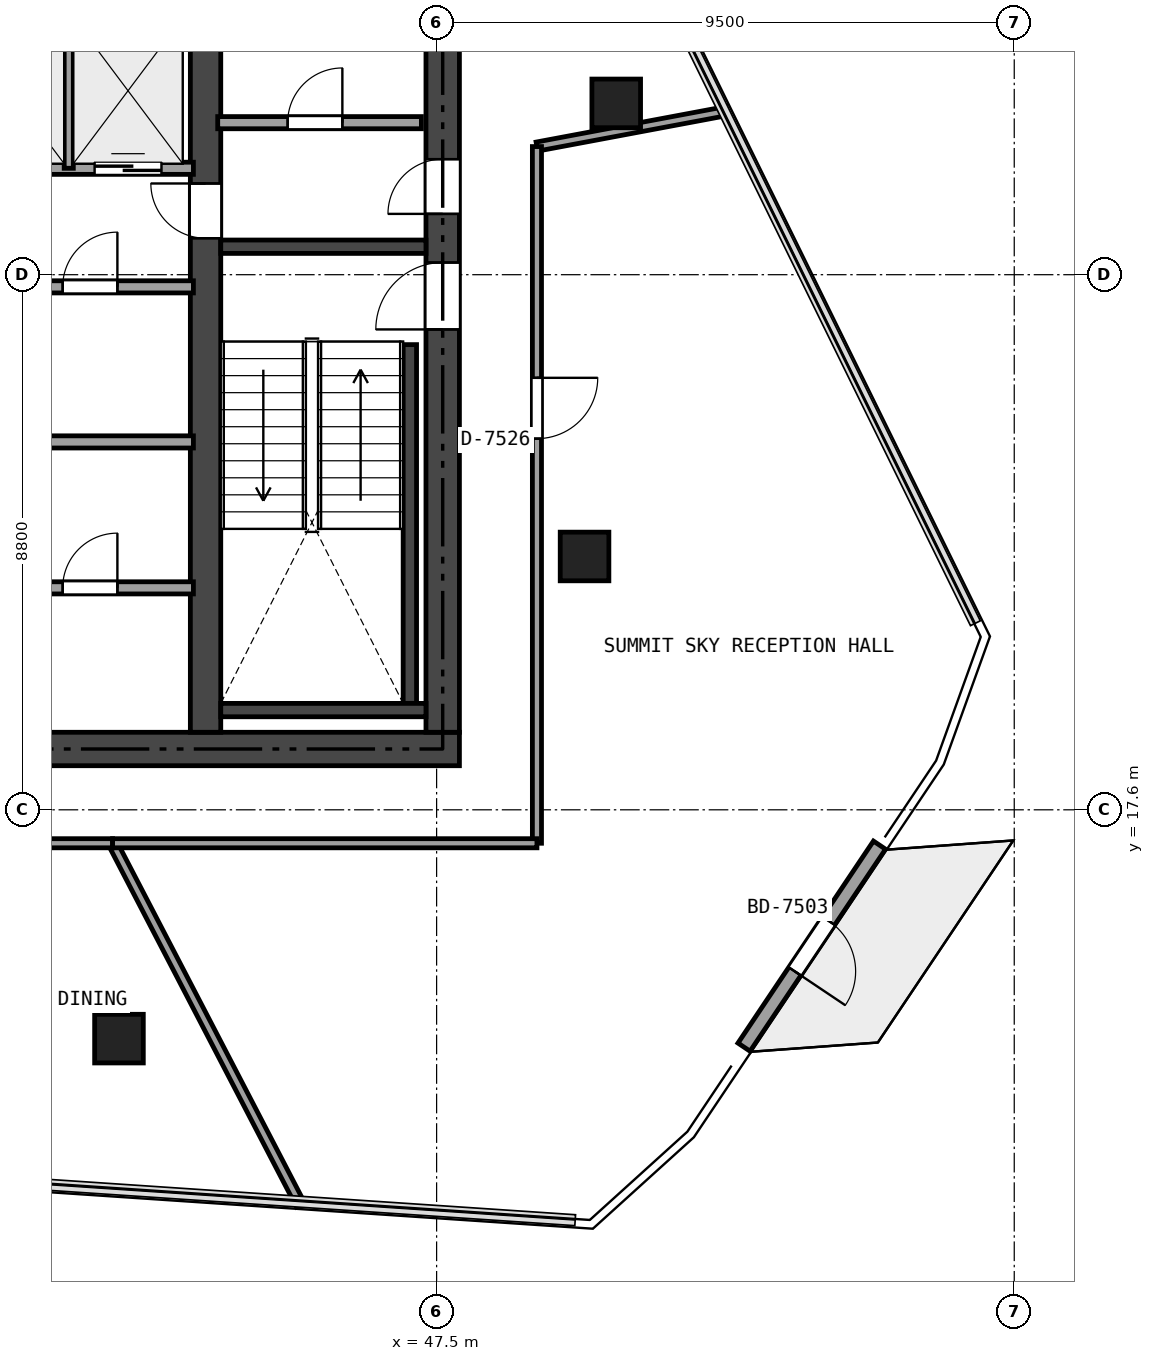
"""IFC4 building model, lengths in metres.
Left out: names, types, materials, properties, quantities, classifications, styles, units other than length and angle.
Written with IfcOpenShell. Run it as: python <this file> out.ifc"""

import sys

from ifc_helpers import new_model, si_unit, direction, frame, frame_2d, origin, origin_2d, place, context, subcontext, project, spatial, rectangle, extrude, element, fill, save


model = new_model("IFC4")
c1 = context("Model", 3, precision=1e-05, world=origin(), true_north=direction((0.0, 1.0)))
c2 = subcontext(c1, "Body", "Model", "MODEL_VIEW")
j1 = project(units=[si_unit("LENGTHUNIT", "METRE"), si_unit("PLANEANGLEUNIT", "RADIAN")], contexts=[c1])
p1 = place(None, origin())
s1 = spatial("IfcSite", under=j1, at=p1, CompositionType="ELEMENT")
p2 = place(p1, origin())
s2 = spatial("IfcBuilding", under=s1, at=p2, CompositionType="ELEMENT")
p3 = place(p2, frame((0.0, 0.0, 279.3)))
s3 = spatial("IfcBuildingStorey", under=s2, at=p3, CompositionType="ELEMENT", Elevation=279.3)
p4 = place(p3, frame((26.525, 18.6, 0.0), z_axis=(0.0, 0.0, 1.0), x_axis=(1.0, 0.0, 0.0)))
e1 = element("IfcWall", 1, at=p4, inside=s3, PredefinedType="SHEAR", context=c2, shape_type="SweptSolid", body=[
    extrude(rectangle(XDim=21.35, YDim=0.55, at=frame_2d((10.675, 0.0))), origin(), (0.0, 0.0, 1.0), 3.84),
])
p5 = place(p4, frame((12.4, 0.0, 0.0)))
e2 = element("IfcOpeningElement", 2, at=p5, cuts=e1, PredefinedType="OPENING", context=c2, shape_type="SweptSolid", body=[
    extrude(rectangle(XDim=1.15, YDim=2.15, at=frame_2d((0.575, 1.075))), frame((0.0, 0.285, 0.0), z_axis=(0.0, -1.0, 0.0), x_axis=(1.0, 0.0, 0.0)), (0.0, 0.0, 1.0), 0.57),
])
p6 = place(p4, frame((5.225, 0.0, 0.0)))
e3 = element("IfcOpeningElement", 3, at=p6, cuts=e1, PredefinedType="OPENING", context=c2, shape_type="SweptSolid", body=[
    extrude(rectangle(XDim=0.9, YDim=2.1, at=frame_2d((0.45, 1.05))), frame((0.0, 0.285, 0.0), z_axis=(0.0, -1.0, 0.0), x_axis=(1.0, 0.0, 0.0)), (0.0, 0.0, 1.0), 0.57),
])
p7 = place(p3, frame((47.6, 18.875, 0.0), z_axis=(0.0, 0.0, 1.0), x_axis=(0.0, 1.0, 0.0)))
e4 = element("IfcWall", 4, at=p7, inside=s3, PredefinedType="SHEAR", context=c2, shape_type="SweptSolid", body=[
    extrude(rectangle(XDim=15.05, YDim=0.55, at=frame_2d((7.525, 0.0))), origin(), (0.0, 0.0, 1.0), 3.84),
])
p8 = place(p7, frame((6.625, 0.0, 0.0)))
e5 = element("IfcOpeningElement", 5, at=p8, cuts=e4, PredefinedType="OPENING", context=c2, shape_type="SweptSolid", body=[
    extrude(rectangle(XDim=1.1, YDim=2.15, at=frame_2d((0.55, 1.075))), frame((0.0, 0.285, 0.0), z_axis=(0.0, -1.0, 0.0), x_axis=(1.0, 0.0, 0.0)), (0.0, 0.0, 1.0), 0.57),
])
p9 = place(p7, frame((8.525, 0.0, 0.0)))
e6 = element("IfcOpeningElement", 6, at=p9, cuts=e4, PredefinedType="OPENING", context=c2, shape_type="SweptSolid", body=[
    extrude(rectangle(XDim=0.9, YDim=2.1, at=frame_2d((0.45, 1.05))), frame((0.0, 0.285, 0.0), z_axis=(0.0, -1.0, 0.0), x_axis=(1.0, 0.0, 0.0)), (0.0, 0.0, 1.0), 0.57),
])
p10 = place(p7, frame((13.175, 0.0, 0.0)))
e7 = element("IfcOpeningElement", 7, at=p10, cuts=e4, PredefinedType="OPENING", context=c2, shape_type="SweptSolid", body=[
    extrude(rectangle(XDim=0.9, YDim=2.1, at=frame_2d((0.45, 1.05))), frame((0.0, 0.285, 0.0), z_axis=(0.0, -1.0, 0.0), x_axis=(1.0, 0.0, 0.0)), (0.0, 0.0, 1.0), 0.57),
])
p11 = place(p3, frame((43.7, 18.875, 0.0), z_axis=(0.0, 0.0, 1.0), x_axis=(0.0, 1.0, 0.0)))
e8 = element("IfcWall", 8, at=p11, inside=s3, PredefinedType="SHEAR", context=c2, shape_type="SweptSolid", body=[
    extrude(rectangle(XDim=15.05, YDim=0.5, at=frame_2d((7.525, 0.0))), origin(), (0.0, 0.0, 1.0), 3.84),
])
p12 = place(p11, frame((8.125, 0.0, 0.0)))
e9 = element("IfcOpeningElement", 9, at=p12, cuts=e8, PredefinedType="OPENING", context=c2, shape_type="SweptSolid", body=[
    extrude(rectangle(XDim=0.9, YDim=2.1, at=frame_2d((0.45, 1.05))), frame((0.0, 0.26, 0.0), z_axis=(0.0, -1.0, 0.0), x_axis=(1.0, 0.0, 0.0)), (0.0, 0.0, 1.0), 0.52),
])
p13 = place(p3, frame((43.95, 26.86, 0.0), z_axis=(0.0, 0.0, 1.0), x_axis=(1.0, 0.0, 0.0)))
e10 = element("IfcWall", 10, at=p13, inside=s3, PredefinedType="SHEAR", context=c2, shape_type="SweptSolid", body=[
    extrude(rectangle(XDim=3.375, YDim=0.22, at=frame_2d((1.688, 0.0))), origin(), (0.0, 0.0, 1.0), 3.84),
])
p14 = place(p3, frame((47.06, 19.35, 0.0), z_axis=(0.0, 0.0, 1.0), x_axis=(0.0, 1.0, 0.0)))
e11 = element("IfcWall", 11, at=p14, inside=s3, PredefinedType="SHEAR", context=c2, shape_type="SweptSolid", body=[
    extrude(rectangle(XDim=5.9, YDim=0.22, at=frame_2d((2.95, 0.0))), origin(), (0.0, 0.0, 1.0), 3.84),
])
p15 = place(p3, frame((43.95, 19.24, 0.0), z_axis=(0.0, 0.0, 1.0), x_axis=(1.0, 0.0, 0.0)))
e12 = element("IfcWall", 12, at=p15, inside=s3, PredefinedType="SHEAR", context=c2, shape_type="SweptSolid", body=[
    extrude(rectangle(XDim=3.375, YDim=0.22, at=frame_2d((1.688, 0.0))), origin(), (0.0, 0.0, 1.0), 3.84),
])
for number, where, z_axis, x_axis in (
    (13, (50.454, 29.217, 0.0), (0.0, 0.0, 1.0), (1.0, 0.0, 0.0)),
    (14, (42.276, 13.837, 0.0), (0.0, 0.0, 1.0), (1.0, 0.0, 0.0)),
    (15, (49.933, 21.766, 0.0), (0.0, 0.0, 1.0), (1.0, 0.0, 0.0)),
):
    element("IfcColumn", number, at=place(p3, frame(where, z_axis=z_axis, x_axis=x_axis)), inside=s3, PredefinedType="COLUMN", context=c2, shape_type="SweptSolid", body=[
        extrude(rectangle(XDim=0.8, YDim=0.8, at=origin_2d()), origin(), (0.0, 0.0, 1.0), 3.84),
    ])
p16 = place(p3, frame((54.784, 17.019, 0.0), z_axis=(0.0, 0.0, 1.0), x_axis=(-0.557008009361, -0.830507120685, 0.0)))
e16 = element("IfcWall", 16, at=p16, inside=s3, PredefinedType="SOLIDWALL", context=c2, shape_type="SweptSolid", body=[
    extrude(rectangle(XDim=4.0, YDim=0.24, at=frame_2d((2.0, 0.0))), origin(), (0.0, 0.0, 1.0), 3.84),
])
p17 = place(p16, frame((1.5, 0.0, 0.0)))
e17 = element("IfcOpeningElement", 17, at=p17, cuts=e16, PredefinedType="OPENING", context=c2, shape_type="SweptSolid", body=[
    extrude(rectangle(XDim=1.0, YDim=2.15, at=frame_2d((0.5, 1.075))), frame((0.0, 0.13, 0.0), z_axis=(0.0, -1.0, 0.0), x_axis=(1.0, 0.0, 0.0)), (0.0, 0.0, 1.0), 0.26),
])
p18 = place(p3, frame((43.9, 28.9, 0.0), z_axis=(0.0, 0.0, 1.0), x_axis=(1.0, 0.0, 0.0)))
e18 = element("IfcWall", 18, at=p18, inside=s3, PredefinedType="SOLIDWALL", context=c2, shape_type="SweptSolid", body=[
    extrude(rectangle(XDim=3.35, YDim=0.2, at=frame_2d((1.675, 0.0))), origin(), (0.0, 0.0, 1.0), 3.84),
])
p19 = place(p18, frame((1.15, 0.0, 0.0)))
e19 = element("IfcOpeningElement", 19, at=p19, cuts=e18, PredefinedType="OPENING", context=c2, shape_type="SweptSolid", body=[
    extrude(rectangle(XDim=0.9, YDim=2.1, at=frame_2d((0.45, 1.05))), frame((0.0, 0.11, 0.0), z_axis=(0.0, -1.0, 0.0), x_axis=(1.0, 0.0, 0.0)), (0.0, 0.0, 1.0), 0.22),
])
p20 = place(p3, frame((35.62, 28.15, 0.0), z_axis=(0.0, 0.0, 1.0), x_axis=(1.0, 0.0, 0.0)))
e20 = element("IfcWall", 20, at=p20, inside=s3, PredefinedType="SOLIDWALL", context=c2, shape_type="SweptSolid", body=[
    extrude(rectangle(XDim=7.88, YDim=0.2, at=frame_2d((3.94, 0.0))), origin(), (0.0, 0.0, 1.0), 3.84),
])
p21 = place(p20, frame((0.405, 0.0, 0.0)))
e21 = element("IfcOpeningElement", 21, at=p21, cuts=e20, PredefinedType="OPENING", context=c2, shape_type="SweptSolid", body=[
    extrude(rectangle(XDim=1.1, YDim=2.15, at=frame_2d((0.55, 1.075))), frame((0.0, 0.11, 0.0), z_axis=(0.0, -1.0, 0.0), x_axis=(1.0, 0.0, 0.0)), (0.0, 0.0, 1.0), 0.22),
])
p22 = place(p20, frame((2.355, 0.0, 0.0)))
e22 = element("IfcOpeningElement", 22, at=p22, cuts=e20, PredefinedType="OPENING", context=c2, shape_type="SweptSolid", body=[
    extrude(rectangle(XDim=1.1, YDim=2.15, at=frame_2d((0.55, 1.075))), frame((0.0, 0.11, 0.0), z_axis=(0.0, -1.0, 0.0), x_axis=(1.0, 0.0, 0.0)), (0.0, 0.0, 1.0), 0.22),
])
p23 = place(p20, frame((4.305, 0.0, 0.0)))
e23 = element("IfcOpeningElement", 23, at=p23, cuts=e20, PredefinedType="OPENING", context=c2, shape_type="SweptSolid", body=[
    extrude(rectangle(XDim=1.1, YDim=2.15, at=frame_2d((0.55, 1.075))), frame((0.0, 0.11, 0.0), z_axis=(0.0, -1.0, 0.0), x_axis=(1.0, 0.0, 0.0)), (0.0, 0.0, 1.0), 0.22),
])
p24 = place(p20, frame((6.255, 0.0, 0.0)))
e24 = element("IfcOpeningElement", 24, at=p24, cuts=e20, PredefinedType="OPENING", context=c2, shape_type="SweptSolid", body=[
    extrude(rectangle(XDim=1.1, YDim=2.15, at=frame_2d((0.55, 1.075))), frame((0.0, 0.11, 0.0), z_axis=(0.0, -1.0, 0.0), x_axis=(1.0, 0.0, 0.0)), (0.0, 0.0, 1.0), 0.22),
])
p25 = place(p3, frame((35.62, 26.2, 0.0), z_axis=(0.0, 0.0, 1.0), x_axis=(1.0, 0.0, 0.0)))
e25 = element("IfcWall", 25, at=p25, inside=s3, PredefinedType="SOLIDWALL", context=c2, shape_type="SweptSolid", body=[
    extrude(rectangle(XDim=7.88, YDim=0.2, at=frame_2d((3.94, 0.0))), origin(), (0.0, 0.0, 1.0), 3.84),
])
p26 = place(p25, frame((1.13, 0.0, 0.0)))
e26 = element("IfcOpeningElement", 26, at=p26, cuts=e25, PredefinedType="OPENING", context=c2, shape_type="SweptSolid", body=[
    extrude(rectangle(XDim=0.9, YDim=2.1, at=frame_2d((0.45, 1.05))), frame((0.0, 0.11, 0.0), z_axis=(0.0, -1.0, 0.0), x_axis=(1.0, 0.0, 0.0)), (0.0, 0.0, 1.0), 0.22),
])
p27 = place(p25, frame((5.73, 0.0, 0.0)))
e27 = element("IfcOpeningElement", 27, at=p27, cuts=e25, PredefinedType="OPENING", context=c2, shape_type="SweptSolid", body=[
    extrude(rectangle(XDim=0.9, YDim=2.1, at=frame_2d((0.45, 1.05))), frame((0.0, 0.11, 0.0), z_axis=(0.0, -1.0, 0.0), x_axis=(1.0, 0.0, 0.0)), (0.0, 0.0, 1.0), 0.22),
])
p28 = place(p3, frame((35.62, 23.65, 0.0), z_axis=(0.0, 0.0, 1.0), x_axis=(1.0, 0.0, 0.0)))
e28 = element("IfcWall", 28, at=p28, inside=s3, PredefinedType="SOLIDWALL", context=c2, shape_type="SweptSolid", body=[
    extrude(rectangle(XDim=7.88, YDim=0.2, at=frame_2d((3.94, 0.0))), origin(), (0.0, 0.0, 1.0), 3.361),
])
p29 = place(p3, frame((35.62, 21.25, 0.0), z_axis=(0.0, 0.0, 1.0), x_axis=(1.0, 0.0, 0.0)))
e29 = element("IfcWall", 29, at=p29, inside=s3, PredefinedType="SOLIDWALL", context=c2, shape_type="SweptSolid", body=[
    extrude(rectangle(XDim=7.88, YDim=0.2, at=frame_2d((3.94, 0.0))), origin(), (0.0, 0.0, 1.0), 3.84),
])
p30 = place(p29, frame((1.13, 0.0, 0.0)))
e30 = element("IfcOpeningElement", 30, at=p30, cuts=e29, PredefinedType="OPENING", context=c2, shape_type="SweptSolid", body=[
    extrude(rectangle(XDim=0.9, YDim=2.1, at=frame_2d((0.45, 1.05))), frame((0.0, 0.11, 0.0), z_axis=(0.0, -1.0, 0.0), x_axis=(1.0, 0.0, 0.0)), (0.0, 0.0, 1.0), 0.22),
])
p31 = place(p29, frame((5.73, 0.0, 0.0)))
e31 = element("IfcOpeningElement", 31, at=p31, cuts=e29, PredefinedType="OPENING", context=c2, shape_type="SweptSolid", body=[
    extrude(rectangle(XDim=0.9, YDim=2.1, at=frame_2d((0.45, 1.05))), frame((0.0, 0.11, 0.0), z_axis=(0.0, -1.0, 0.0), x_axis=(1.0, 0.0, 0.0)), (0.0, 0.0, 1.0), 0.22),
])
p32 = place(p3, frame((41.45, 28.15, 0.0), z_axis=(0.0, 0.0, 1.0), x_axis=(0.0, 1.0, 0.0)))
e32 = element("IfcWall", 32, at=p32, inside=s3, PredefinedType="PARTITIONING", context=c2, shape_type="SweptSolid", body=[
    extrude(rectangle(XDim=2.43, YDim=0.15, at=frame_2d((1.215, 0.0))), origin(), (0.0, 0.0, 1.0), 3.84),
])
p33 = place(p3, frame((45.263, 11.102, 0.0), z_axis=(0.0, 0.0, 1.0), x_axis=(-0.461244944401, 0.887272844882, 0.0)))
e33 = element("IfcWall", 33, at=p33, inside=s3, PredefinedType="PARTITIONING", context=c2, shape_type="SweptSolid", body=[
    extrude(rectangle(XDim=6.704, YDim=0.15, at=frame_2d((3.352, 0.0))), origin(), (0.0, 0.0, 1.0), 3.365),
])
p34 = place(p3, frame((42.171, 17.05, 0.0), z_axis=(0.0, 0.0, 1.0), x_axis=(-1.0, 0.0, 0.0)))
e34 = element("IfcWall", 34, at=p34, inside=s3, PredefinedType="PARTITIONING", context=c2, shape_type="SweptSolid", body=[
    extrude(rectangle(XDim=14.0, YDim=0.15, at=frame_2d((7.0, 0.0))), origin(), (0.0, 0.0, 1.0), 3.289),
])
p35 = place(p34, frame((6.5, 0.0, 0.0)))
e35 = element("IfcOpeningElement", 35, at=p35, cuts=e34, PredefinedType="OPENING", context=c2, shape_type="SweptSolid", body=[
    extrude(rectangle(XDim=1.0, YDim=2.15, at=frame_2d((0.5, 1.075))), frame((0.0, 0.085, 0.0), z_axis=(0.0, -1.0, 0.0), x_axis=(1.0, 0.0, 0.0)), (0.0, 0.0, 1.0), 0.17),
])
p36 = place(p3, frame((52.272, 29.092, 0.0), z_axis=(0.0, 0.0, 1.0), x_axis=(-0.982896541784, -0.184158595098, 0.0)))
e36 = element("IfcWall", 36, at=p36, inside=s3, PredefinedType="PARTITIONING", context=c2, shape_type="SweptSolid", body=[
    extrude(rectangle(XDim=3.177, YDim=0.15, at=frame_2d((1.588, 0.0))), origin(), (0.0, 0.0, 1.0), 3.365),
])
p37 = place(p3, frame((49.15, 28.507, 0.0), z_axis=(0.0, 0.0, 1.0), x_axis=(0.0, -1.0, 0.0)))
e37 = element("IfcWall", 37, at=p37, inside=s3, PredefinedType="PARTITIONING", context=c2, shape_type="SweptSolid", body=[
    extrude(rectangle(XDim=11.457, YDim=0.15, at=frame_2d((5.729, 0.0))), origin(), (0.0, 0.0, 1.0), 3.289),
])
p38 = place(p37, frame((3.803, 0.0, 0.0)))
e38 = element("IfcOpeningElement", 38, at=p38, cuts=e37, PredefinedType="OPENING", context=c2, shape_type="SweptSolid", body=[
    extrude(rectangle(XDim=1.0, YDim=2.15, at=frame_2d((0.5, 1.075))), frame((0.0, 0.085, 0.0), z_axis=(0.0, -1.0, 0.0), x_axis=(1.0, 0.0, 0.0)), (0.0, 0.0, 1.0), 0.17),
])
p39 = place(p3, frame((49.15, 17.05, 0.0), z_axis=(0.0, 0.0, 1.0), x_axis=(-1.0, 0.0, 0.0)))
e39 = element("IfcWall", 39, at=p39, inside=s3, PredefinedType="PARTITIONING", context=c2, shape_type="SweptSolid", body=[
    extrude(rectangle(XDim=6.979, YDim=0.15, at=frame_2d((3.49, 0.0))), origin(), (0.0, 0.0, 1.0), 3.365),
])
p40 = place(p17, origin())
e40 = element("IfcDoor", 40, at=p40, inside=s3, OperationType="SINGLE_SWING_RIGHT", PredefinedType="DOOR", context=c2, shape_type="SweptSolid", body=[
    extrude(rectangle(XDim=1.0, YDim=2.15, at=frame_2d((0.5, 1.075))), frame((0.0, 0.025, 0.0), z_axis=(0.0, -1.0, 0.0), x_axis=(1.0, 0.0, 0.0)), (0.0, 0.0, 1.0), 0.05),
])
fill(e17, e40)
p41 = place(p8, origin())
e41 = element("IfcDoor", 41, at=p41, inside=s3, OperationType="SINGLE_SWING_LEFT", PredefinedType="DOOR", context=c2, shape_type="SweptSolid", body=[
    extrude(rectangle(XDim=1.1, YDim=2.15, at=frame_2d((0.55, 1.075))), frame((0.0, 0.025, 0.0), z_axis=(0.0, -1.0, 0.0), x_axis=(1.0, 0.0, 0.0)), (0.0, 0.0, 1.0), 0.05),
])
fill(e5, e41)
p42 = place(p12, origin())
e42 = element("IfcDoor", 42, at=p42, inside=s3, OperationType="SINGLE_SWING_RIGHT", PredefinedType="DOOR", context=c2, shape_type="SweptSolid", body=[
    extrude(rectangle(XDim=0.9, YDim=2.1, at=frame_2d((0.45, 1.05))), frame((0.0, 0.025, 0.0), z_axis=(0.0, -1.0, 0.0), x_axis=(1.0, 0.0, 0.0)), (0.0, 0.0, 1.0), 0.05),
])
fill(e9, e42)
p43 = place(p9, origin())
e43 = element("IfcDoor", 43, at=p43, inside=s3, OperationType="SINGLE_SWING_LEFT", PredefinedType="DOOR", context=c2, shape_type="SweptSolid", body=[
    extrude(rectangle(XDim=0.9, YDim=2.1, at=frame_2d((0.45, 1.05))), frame((0.0, 0.025, 0.0), z_axis=(0.0, -1.0, 0.0), x_axis=(1.0, 0.0, 0.0)), (0.0, 0.0, 1.0), 0.05),
])
fill(e6, e43)
p44 = place(p19, origin())
e44 = element("IfcDoor", 44, at=p44, inside=s3, OperationType="SINGLE_SWING_RIGHT", PredefinedType="DOOR", context=c2, shape_type="SweptSolid", body=[
    extrude(rectangle(XDim=0.9, YDim=2.1, at=frame_2d((0.45, 1.05))), frame((0.0, 0.025, 0.0), z_axis=(0.0, -1.0, 0.0), x_axis=(1.0, 0.0, 0.0)), (0.0, 0.0, 1.0), 0.05),
])
fill(e19, e44)
p45 = place(p31, origin())
e45 = element("IfcDoor", 45, at=p45, inside=s3, OperationType="SINGLE_SWING_RIGHT", PredefinedType="DOOR", context=c2, shape_type="SweptSolid", body=[
    extrude(rectangle(XDim=0.9, YDim=2.1, at=frame_2d((0.45, 1.05))), frame((0.0, 0.025, 0.0), z_axis=(0.0, -1.0, 0.0), x_axis=(1.0, 0.0, 0.0)), (0.0, 0.0, 1.0), 0.05),
])
fill(e31, e45)
p46 = place(p27, origin())
e46 = element("IfcDoor", 46, at=p46, inside=s3, OperationType="SINGLE_SWING_RIGHT", PredefinedType="DOOR", context=c2, shape_type="SweptSolid", body=[
    extrude(rectangle(XDim=0.9, YDim=2.1, at=frame_2d((0.45, 1.05))), frame((0.0, 0.025, 0.0), z_axis=(0.0, -1.0, 0.0), x_axis=(1.0, 0.0, 0.0)), (0.0, 0.0, 1.0), 0.05),
])
fill(e27, e46)
p47 = place(p24, origin())
e47 = element("IfcDoor", 47, at=p47, inside=s3, OperationType="SLIDING_TO_LEFT", PredefinedType="DOOR", context=c2, shape_type="SweptSolid", body=[
    extrude(rectangle(XDim=1.1, YDim=2.15, at=frame_2d((0.55, 1.075))), frame((0.0, 0.025, 0.0), z_axis=(0.0, -1.0, 0.0), x_axis=(1.0, 0.0, 0.0)), (0.0, 0.0, 1.0), 0.05),
])
fill(e24, e47)
p48 = place(p38, origin())
e48 = element("IfcDoor", 48, at=p48, inside=s3, OperationType="SINGLE_SWING_LEFT", PredefinedType="DOOR", context=c2, shape_type="SweptSolid", body=[
    extrude(rectangle(XDim=1.0, YDim=2.15, at=frame_2d((0.5, 1.075))), frame((0.0, 0.025, 0.0), z_axis=(0.0, -1.0, 0.0), x_axis=(1.0, 0.0, 0.0)), (0.0, 0.0, 1.0), 0.05),
])
fill(e38, e48)
save(model, sys.argv[1])
